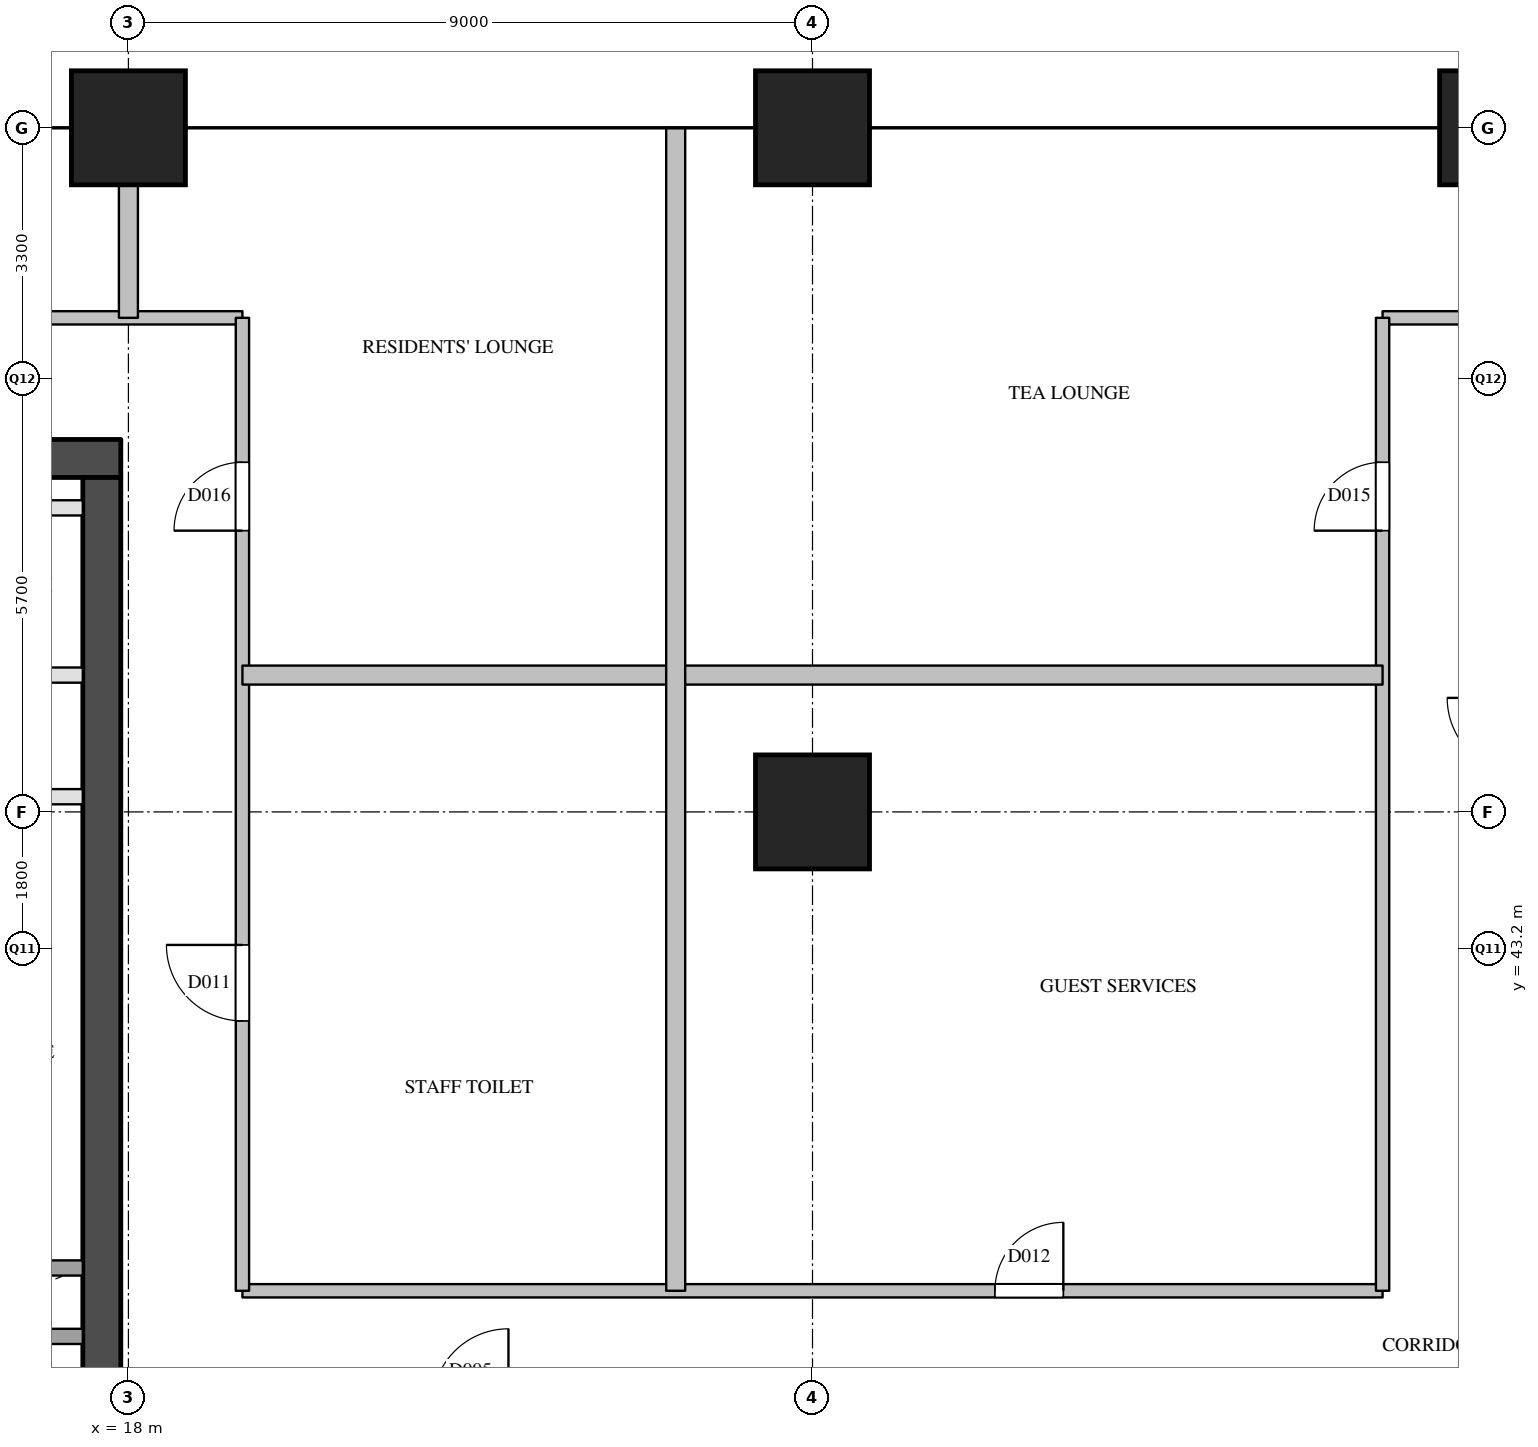
"""IFC4 building model, lengths in metres.
Left out: names, types, materials, properties, quantities, classifications, styles, units other than length and angle.
Written with IfcOpenShell. Run it as: python <this file> out.ifc"""

import sys

from ifc_helpers import new_model, si_unit, direction, frame, frame_2d, origin, origin_2d, place, context, subcontext, project, spatial, rectangle, extrude, element, fill, save


model = new_model("IFC4")
c1 = context("Model", 3, precision=1e-05, world=origin(), true_north=direction((0.0, 1.0)))
c2 = subcontext(c1, "Body", "Model", "MODEL_VIEW")
j1 = project(units=[si_unit("LENGTHUNIT", "METRE"), si_unit("PLANEANGLEUNIT", "RADIAN")], contexts=[c1])
p1 = place(None, origin())
s1 = spatial("IfcSite", under=j1, at=p1, CompositionType="ELEMENT")
p2 = place(p1, origin())
s2 = spatial("IfcBuilding", under=s1, at=p2, CompositionType="ELEMENT")
p3 = place(p2, frame((0.0, 0.0, 146.6)))
s3 = spatial("IfcBuildingStorey", under=s2, at=p3, CompositionType="ELEMENT", Elevation=146.6)
for number, where, z_axis, x_axis in (
    (1, (18.0, 54.0, 0.0), (0.0, 0.0, 1.0), (1.0, 0.0, 0.0)),
    (2, (27.0, 45.0, 0.0), (0.0, 0.0, 1.0), (1.0, 0.0, 0.0)),
    (3, (27.0, 54.0, 0.0), (0.0, 0.0, 1.0), (1.0, 0.0, 0.0)),
    (4, (36.0, 54.0, 0.0), (0.0, 0.0, 1.0), (1.0, 0.0, 0.0)),
):
    element("IfcColumn", number, at=place(p3, frame(where, z_axis=z_axis, x_axis=x_axis)), inside=s3, PredefinedType="COLUMN", context=c2, shape_type="SweptSolid", body=[
        extrude(rectangle(XDim=1.5, YDim=1.5, at=origin_2d()), origin(), (0.0, 0.0, 1.0), 3.9),
    ])
p4 = place(p3, frame((5.7, 49.65, 0.0), z_axis=(0.0, 0.0, 1.0), x_axis=(1.0, 0.0, 0.0)))
e5 = element("IfcWall", 5, at=p4, inside=s3, PredefinedType="SHEAR", context=c2, shape_type="SweptSolid", body=[
    extrude(rectangle(XDim=12.2, YDim=0.5, at=frame_2d((6.1, 0.0))), origin(), (0.0, 0.0, 1.0), 3.6),
])
p5 = place(p3, frame((17.65, 29.1, 0.0), z_axis=(0.0, 0.0, 1.0), x_axis=(0.0, 1.0, 0.0)))
e6 = element("IfcWall", 6, at=p5, inside=s3, PredefinedType="SHEAR", context=c2, shape_type="SweptSolid", body=[
    extrude(rectangle(XDim=20.3, YDim=0.5, at=frame_2d((10.15, 0.0))), origin(), (0.0, 0.0, 1.0), 3.6),
])
p6 = place(p5, frame((1.25, 0.0, 0.0)))
e7 = element("IfcOpeningElement", 7, at=p6, cuts=e6, PredefinedType="OPENING", context=c2, shape_type="SweptSolid", body=[
    extrude(rectangle(XDim=0.7, YDim=2.1, at=frame_2d((0.35, 1.05))), frame((0.0, 0.26, 0.0), z_axis=(0.0, -1.0, 0.0), x_axis=(1.0, 0.0, 0.0)), (0.0, 0.0, 1.0), 0.52),
])
p7 = place(p5, frame((7.05, 0.0, 0.0)))
e8 = element("IfcOpeningElement", 8, at=p7, cuts=e6, PredefinedType="OPENING", context=c2, shape_type="SweptSolid", body=[
    extrude(rectangle(XDim=0.7, YDim=2.1, at=frame_2d((0.35, 1.05))), frame((0.0, 0.26, 0.0), z_axis=(0.0, -1.0, 0.0), x_axis=(1.0, 0.0, 0.0)), (0.0, 0.0, 1.0), 0.52),
])
p8 = place(p5, frame((3.6, 0.0, 0.0)))
e9 = element("IfcOpeningElement", 9, at=p8, cuts=e6, PredefinedType="OPENING", context=c2, shape_type="SweptSolid", body=[
    extrude(rectangle(XDim=1.8, YDim=2.1, at=frame_2d((0.9, 1.05))), frame((0.0, 0.26, 0.0), z_axis=(0.0, -1.0, 0.0), x_axis=(1.0, 0.0, 0.0)), (0.0, 0.0, 1.0), 0.52),
])
p9 = place(p3, frame((6.2, 38.1, 0.0), z_axis=(0.0, 0.0, 1.0), x_axis=(1.0, 0.0, 0.0)))
e10 = element("IfcWall", 10, at=p9, inside=s3, PredefinedType="SOLIDWALL", context=c2, shape_type="SweptSolid", body=[
    extrude(rectangle(XDim=11.2, YDim=0.2, at=frame_2d((5.6, 0.0))), origin(), (0.0, 0.0, 1.0), 3.6),
])
p10 = place(p9, frame((8.85, 0.0, 0.0)))
e11 = element("IfcOpeningElement", 11, at=p10, cuts=e10, PredefinedType="OPENING", context=c2, shape_type="SweptSolid", body=[
    extrude(rectangle(XDim=1.2, YDim=2.1, at=frame_2d((0.6, 1.05))), frame((0.0, 0.11, 0.0), z_axis=(0.0, -1.0, 0.0), x_axis=(1.0, 0.0, 0.0)), (0.0, 0.0, 1.0), 0.22),
])
p11 = place(p3, frame((12.5, 39.0, 0.0), z_axis=(0.0, 0.0, 1.0), x_axis=(1.0, 0.0, 0.0)))
e12 = element("IfcWall", 12, at=p11, inside=s3, PredefinedType="SOLIDWALL", context=c2, shape_type="SweptSolid", body=[
    extrude(rectangle(XDim=4.9, YDim=0.2, at=frame_2d((2.45, 0.0))), origin(), (0.0, 0.0, 1.0), 3.6),
])
p12 = place(p3, frame((12.5, 45.2, 0.0), z_axis=(0.0, 0.0, 1.0), x_axis=(1.0, 0.0, 0.0)))
e13 = element("IfcWall", 13, at=p12, inside=s3, PredefinedType="PARTITIONING", context=c2, shape_type="SweptSolid", body=[
    extrude(rectangle(XDim=4.9, YDim=0.2, at=frame_2d((2.45, 0.0))), origin(), (0.0, 0.0, 1.0), 3.6),
])
p13 = place(p12, frame((0.53, 0.0, 0.0)))
e14 = element("IfcOpeningElement", 14, at=p13, cuts=e13, PredefinedType="OPENING", context=c2, shape_type="SweptSolid", body=[
    extrude(rectangle(XDim=0.9, YDim=2.1, at=frame_2d((0.45, 1.05))), frame((0.0, 0.11, 0.0), z_axis=(0.0, -1.0, 0.0), x_axis=(1.0, 0.0, 0.0)), (0.0, 0.0, 1.0), 0.22),
])
p14 = place(p12, frame((2.98, 0.0, 0.0)))
e15 = element("IfcOpeningElement", 15, at=p14, cuts=e13, PredefinedType="OPENING", context=c2, shape_type="SweptSolid", body=[
    extrude(rectangle(XDim=0.9, YDim=2.1, at=frame_2d((0.45, 1.05))), frame((0.0, 0.11, 0.0), z_axis=(0.0, -1.0, 0.0), x_axis=(1.0, 0.0, 0.0)), (0.0, 0.0, 1.0), 0.22),
])
p15 = place(p3, frame((6.2, 46.8, 0.0), z_axis=(0.0, 0.0, 1.0), x_axis=(1.0, 0.0, 0.0)))
e16 = element("IfcWall", 16, at=p15, inside=s3, PredefinedType="PARTITIONING", context=c2, shape_type="SweptSolid", body=[
    extrude(rectangle(XDim=11.2, YDim=0.2, at=frame_2d((5.6, 0.0))), origin(), (0.0, 0.0, 1.0), 3.6),
])
p16 = place(p15, frame((1.23, 0.0, 0.0)))
e17 = element("IfcOpeningElement", 17, at=p16, cuts=e16, PredefinedType="OPENING", context=c2, shape_type="SweptSolid", body=[
    extrude(rectangle(XDim=0.9, YDim=2.1, at=frame_2d((0.45, 1.05))), frame((0.0, 0.11, 0.0), z_axis=(0.0, -1.0, 0.0), x_axis=(1.0, 0.0, 0.0)), (0.0, 0.0, 1.0), 0.22),
])
p17 = place(p15, frame((6.83, 0.0, 0.0)))
e18 = element("IfcOpeningElement", 18, at=p17, cuts=e16, PredefinedType="OPENING", context=c2, shape_type="SweptSolid", body=[
    extrude(rectangle(XDim=0.9, YDim=2.1, at=frame_2d((0.45, 1.05))), frame((0.0, 0.11, 0.0), z_axis=(0.0, -1.0, 0.0), x_axis=(1.0, 0.0, 0.0)), (0.0, 0.0, 1.0), 0.22),
])
p18 = place(p3, frame((6.2, 49.0, 0.0), z_axis=(0.0, 0.0, 1.0), x_axis=(1.0, 0.0, 0.0)))
e19 = element("IfcWall", 19, at=p18, inside=s3, PredefinedType="PARTITIONING", context=c2, shape_type="SweptSolid", body=[
    extrude(rectangle(XDim=11.2, YDim=0.2, at=frame_2d((5.6, 0.0))), origin(), (0.0, 0.0, 1.0), 3.6),
])
p19 = place(p3, frame((19.5, 38.7, 0.0), z_axis=(0.0, 0.0, 1.0), x_axis=(1.0, 0.0, 0.0)))
e20 = element("IfcWall", 20, at=p19, inside=s3, PredefinedType="PARTITIONING", context=c2, shape_type="SweptSolid", body=[
    extrude(rectangle(XDim=15.0, YDim=0.175, at=frame_2d((7.5, 0.0))), origin(), (0.0, 0.0, 1.0), 2.6),
])
p20 = place(p19, frame((9.9, 0.0, 0.0)))
e21 = element("IfcOpeningElement", 21, at=p20, cuts=e20, PredefinedType="OPENING", context=c2, shape_type="SweptSolid", body=[
    extrude(rectangle(XDim=0.9, YDim=2.1, at=frame_2d((0.45, 1.05))), frame((0.0, 0.097, 0.0), z_axis=(0.0, -1.0, 0.0), x_axis=(1.0, 0.0, 0.0)), (0.0, 0.0, 1.0), 0.195),
])
p21 = place(p3, frame((4.1, 51.5, 0.0), z_axis=(0.0, 0.0, 1.0), x_axis=(1.0, 0.0, 0.0)))
e22 = element("IfcWall", 22, at=p21, inside=s3, PredefinedType="PARTITIONING", context=c2, shape_type="SweptSolid", body=[
    extrude(rectangle(XDim=15.4, YDim=0.175, at=frame_2d((7.7, 0.0))), origin(), (0.0, 0.0, 1.0), 3.6),
])
p22 = place(p21, frame((8.05, 0.0, 0.0)))
e23 = element("IfcOpeningElement", 23, at=p22, cuts=e22, PredefinedType="OPENING", context=c2, shape_type="SweptSolid", body=[
    extrude(rectangle(XDim=0.9, YDim=2.1, at=frame_2d((0.45, 1.05))), frame((0.0, 0.097, 0.0), z_axis=(0.0, -1.0, 0.0), x_axis=(1.0, 0.0, 0.0)), (0.0, 0.0, 1.0), 0.195),
])
p23 = place(p3, frame((34.5, 51.5, 0.0), z_axis=(0.0, 0.0, 1.0), x_axis=(1.0, 0.0, 0.0)))
e24 = element("IfcWall", 24, at=p23, inside=s3, PredefinedType="PARTITIONING", context=c2, shape_type="SweptSolid", body=[
    extrude(rectangle(XDim=15.4, YDim=0.175, at=frame_2d((7.7, 0.0))), origin(), (0.0, 0.0, 1.0), 3.6),
])
p24 = place(p23, frame((11.479, 0.0, 0.0)))
e25 = element("IfcOpeningElement", 25, at=p24, cuts=e24, PredefinedType="OPENING", context=c2, shape_type="SweptSolid", body=[
    extrude(rectangle(XDim=0.9, YDim=2.1, at=frame_2d((0.45, 1.05))), frame((0.0, 0.097, 0.0), z_axis=(0.0, -1.0, 0.0), x_axis=(1.0, 0.0, 0.0)), (0.0, 0.0, 1.0), 0.195),
])
p25 = place(p23, frame((4.65, 0.0, 0.0)))
e26 = element("IfcOpeningElement", 26, at=p25, cuts=e24, PredefinedType="OPENING", context=c2, shape_type="SweptSolid", body=[
    extrude(rectangle(XDim=0.9, YDim=2.1, at=frame_2d((0.45, 1.05))), frame((0.0, 0.097, 0.0), z_axis=(0.0, -1.0, 0.0), x_axis=(1.0, 0.0, 0.0)), (0.0, 0.0, 1.0), 0.195),
])
p26 = place(p3, frame((19.5, 38.7, 0.0), z_axis=(0.0, 0.0, 1.0), x_axis=(0.0, 1.0, 0.0)))
e27 = element("IfcWall", 27, at=p26, inside=s3, PredefinedType="PARTITIONING", context=c2, shape_type="SweptSolid", body=[
    extrude(rectangle(XDim=12.8, YDim=0.175, at=frame_2d((6.4, 0.0))), origin(), (0.0, 0.0, 1.0), 3.6),
])
p27 = place(p26, frame((3.55, 0.0, 0.0)))
e28 = element("IfcOpeningElement", 28, at=p27, cuts=e27, PredefinedType="OPENING", context=c2, shape_type="SweptSolid", body=[
    extrude(rectangle(XDim=1.0, YDim=2.1, at=frame_2d((0.5, 1.05))), frame((0.0, 0.097, 0.0), z_axis=(0.0, -1.0, 0.0), x_axis=(1.0, 0.0, 0.0)), (0.0, 0.0, 1.0), 0.195),
])
p28 = place(p26, frame((10.0, 0.0, 0.0)))
e29 = element("IfcOpeningElement", 29, at=p28, cuts=e27, PredefinedType="OPENING", context=c2, shape_type="SweptSolid", body=[
    extrude(rectangle(XDim=0.9, YDim=2.1, at=frame_2d((0.45, 1.05))), frame((0.0, 0.097, 0.0), z_axis=(0.0, -1.0, 0.0), x_axis=(1.0, 0.0, 0.0)), (0.0, 0.0, 1.0), 0.195),
])
p29 = place(p3, frame((34.5, 38.7, 0.0), z_axis=(0.0, 0.0, 1.0), x_axis=(0.0, 1.0, 0.0)))
e30 = element("IfcWall", 30, at=p29, inside=s3, PredefinedType="PARTITIONING", context=c2, shape_type="SweptSolid", body=[
    extrude(rectangle(XDim=12.8, YDim=0.175, at=frame_2d((6.4, 0.0))), origin(), (0.0, 0.0, 1.0), 3.6),
])
p30 = place(p29, frame((10.0, 0.0, 0.0)))
e31 = element("IfcOpeningElement", 31, at=p30, cuts=e30, PredefinedType="OPENING", context=c2, shape_type="SweptSolid", body=[
    extrude(rectangle(XDim=0.9, YDim=2.1, at=frame_2d((0.45, 1.05))), frame((0.0, 0.097, 0.0), z_axis=(0.0, -1.0, 0.0), x_axis=(1.0, 0.0, 0.0)), (0.0, 0.0, 1.0), 0.195),
])
p31 = place(p3, frame((19.5, 46.8, 0.0), z_axis=(0.0, 0.0, 1.0), x_axis=(1.0, 0.0, 0.0)))
e32 = element("IfcWall", 32, at=p31, inside=s3, PredefinedType="PARTITIONING", context=c2, shape_type="SweptSolid", body=[
    extrude(rectangle(XDim=15.0, YDim=0.25, at=frame_2d((7.5, 0.0))), origin(), (0.0, 0.0, 1.0), 2.6),
])
p32 = place(p3, frame((18.0, 51.5, 0.0), z_axis=(0.0, 0.0, 1.0), x_axis=(0.0, 1.0, 0.0)))
e33 = element("IfcWall", 33, at=p32, inside=s3, PredefinedType="PARTITIONING", context=c2, shape_type="SweptSolid", body=[
    extrude(rectangle(XDim=2.5, YDim=0.25, at=frame_2d((1.25, 0.0))), origin(), (0.0, 0.0, 1.0), 3.6),
])
p33 = place(p3, frame((25.2, 38.7, 0.0), z_axis=(0.0, 0.0, 1.0), x_axis=(0.0, 1.0, 0.0)))
e34 = element("IfcWall", 34, at=p33, inside=s3, PredefinedType="PARTITIONING", context=c2, shape_type="SweptSolid", body=[
    extrude(rectangle(XDim=15.3, YDim=0.25, at=frame_2d((7.65, 0.0))), origin(), (0.0, 0.0, 1.0), 2.6),
])
p34 = place(p27, origin())
e35 = element("IfcDoor", 35, at=p34, inside=s3, OperationType="SINGLE_SWING_RIGHT", PredefinedType="DOOR", context=c2, shape_type="SweptSolid", body=[
    extrude(rectangle(XDim=1.0, YDim=2.1, at=frame_2d((0.5, 1.05))), frame((0.0, 0.025, 0.0), z_axis=(0.0, -1.0, 0.0), x_axis=(1.0, 0.0, 0.0)), (0.0, 0.0, 1.0), 0.05),
])
fill(e28, e35)
p35 = place(p20, origin())
e36 = element("IfcDoor", 36, at=p35, inside=s3, OperationType="SINGLE_SWING_RIGHT", PredefinedType="DOOR", context=c2, shape_type="SweptSolid", body=[
    extrude(rectangle(XDim=0.9, YDim=2.1, at=frame_2d((0.45, 1.05))), frame((0.0, 0.025, 0.0), z_axis=(0.0, -1.0, 0.0), x_axis=(1.0, 0.0, 0.0)), (0.0, 0.0, 1.0), 0.05),
])
fill(e21, e36)
p36 = place(p30, origin())
e37 = element("IfcDoor", 37, at=p36, inside=s3, OperationType="SINGLE_SWING_LEFT", PredefinedType="DOOR", context=c2, shape_type="SweptSolid", body=[
    extrude(rectangle(XDim=0.9, YDim=2.1, at=frame_2d((0.45, 1.05))), frame((0.0, 0.025, 0.0), z_axis=(0.0, -1.0, 0.0), x_axis=(1.0, 0.0, 0.0)), (0.0, 0.0, 1.0), 0.05),
])
fill(e31, e37)
p37 = place(p28, origin())
e38 = element("IfcDoor", 38, at=p37, inside=s3, OperationType="SINGLE_SWING_LEFT", PredefinedType="DOOR", context=c2, shape_type="SweptSolid", body=[
    extrude(rectangle(XDim=0.9, YDim=2.1, at=frame_2d((0.45, 1.05))), frame((0.0, 0.025, 0.0), z_axis=(0.0, -1.0, 0.0), x_axis=(1.0, 0.0, 0.0)), (0.0, 0.0, 1.0), 0.05),
])
fill(e29, e38)
save(model, sys.argv[1])
